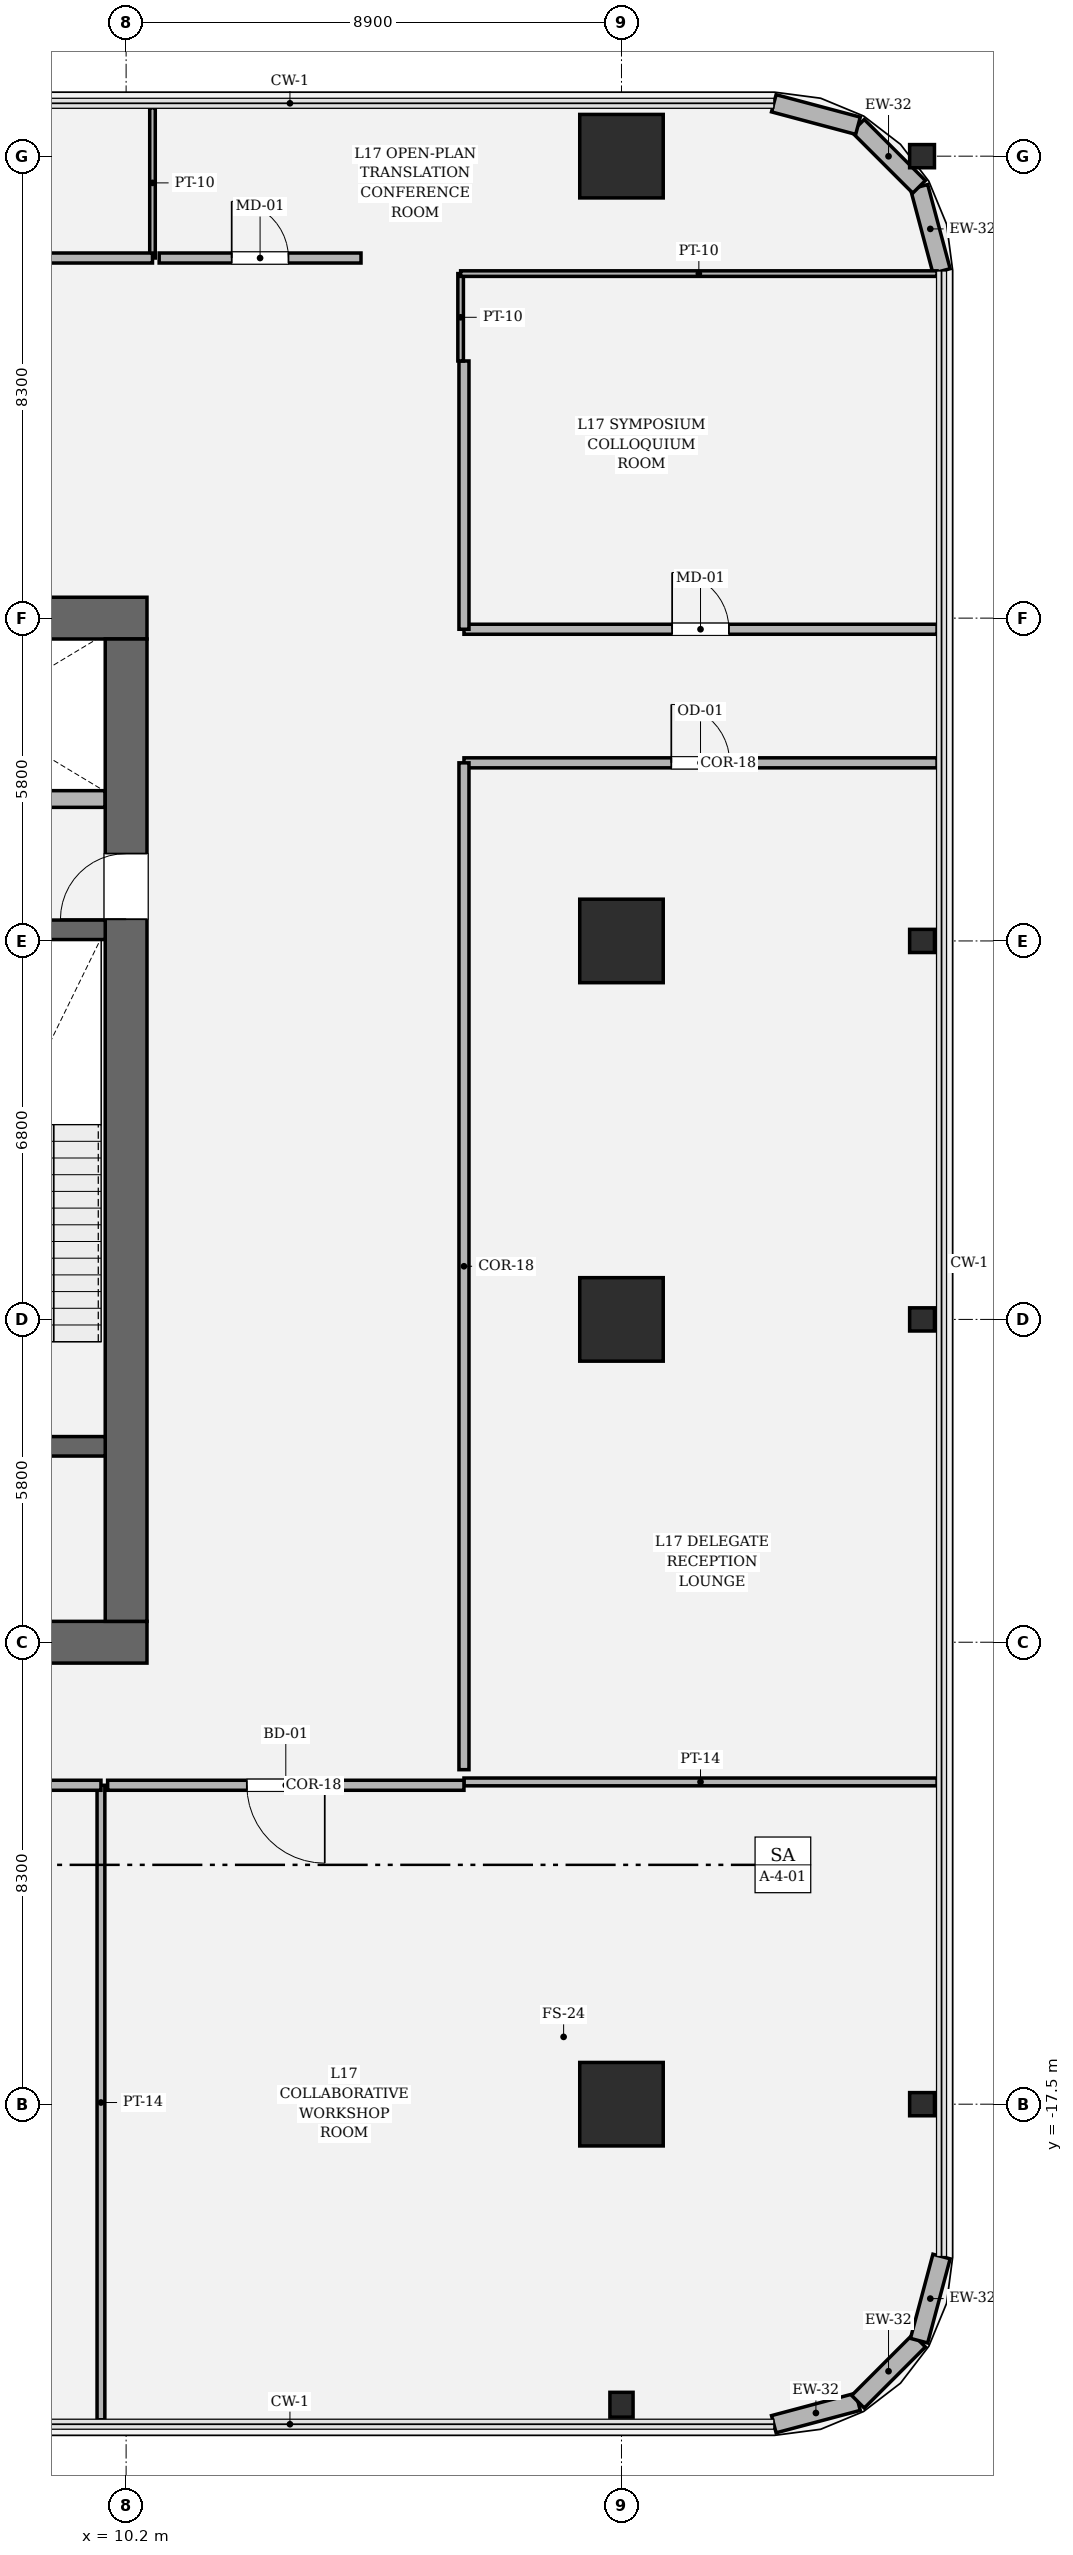
"""IFC4 building model, lengths in metres.
Left out: names, types, materials, properties, quantities, classifications, styles, units other than length and angle.
Written with IfcOpenShell. Run it as: python <this file> out.ifc"""

import sys

from ifc_helpers import new_model, si_unit, direction, frame, frame_2d, origin, origin_2d, place, context, subcontext, project, spatial, rectangle, hollow_rectangle, i_section, extrude, element, fill, save


model = new_model("IFC4")
c1 = context("Model", 3, precision=1e-05, world=origin(), true_north=direction((0.0, 1.0)))
c2 = subcontext(c1, "Body", "Model", "MODEL_VIEW")
j1 = project(units=[si_unit("LENGTHUNIT", "METRE"), si_unit("PLANEANGLEUNIT", "RADIAN")], contexts=[c1])
p1 = place(None, origin())
s1 = spatial("IfcSite", under=j1, at=p1, CompositionType="ELEMENT")
p2 = place(p1, origin())
s2 = spatial("IfcBuilding", under=s1, at=p2, CompositionType="ELEMENT")
p3 = place(p2, frame((0.0, 0.0, 76.8)))
s3 = spatial("IfcBuildingStorey", under=s2, at=p3, CompositionType="ELEMENT", Elevation=76.8)
p4 = place(p3, frame((10.575, -9.2, 0.0), z_axis=(0.0, 0.0, 1.0), x_axis=(-1.0, 0.0, 0.0)))
e1 = element("IfcWall", 1, at=p4, inside=s3, PredefinedType="SHEAR", context=c2, shape_type="SweptSolid", body=[
    extrude(rectangle(XDim=21.15, YDim=0.75, at=frame_2d((10.575, 0.0))), origin(), (0.0, 0.0, 1.0), 4.05),
])
p5 = place(p4, frame((2.85, 0.0, 0.0)))
e2 = element("IfcOpeningElement", 2, at=p5, cuts=e1, PredefinedType="OPENING", context=c2, shape_type="SweptSolid", body=[
    extrude(rectangle(XDim=1.25, YDim=2.25, at=frame_2d((0.625, 1.125))), frame((0.0, 0.385, 0.0), z_axis=(0.0, -1.0, 0.0), x_axis=(1.0, 0.0, 0.0)), (0.0, 0.0, 1.0), 0.77),
])
p6 = place(p4, frame((17.05, 0.0, 0.0)))
e3 = element("IfcOpeningElement", 3, at=p6, cuts=e1, PredefinedType="OPENING", context=c2, shape_type="SweptSolid", body=[
    extrude(rectangle(XDim=1.25, YDim=2.25, at=frame_2d((0.625, 1.125))), frame((0.0, 0.385, 0.0), z_axis=(0.0, -1.0, 0.0), x_axis=(1.0, 0.0, 0.0)), (0.0, 0.0, 1.0), 0.77),
])
p7 = place(p3, frame((-10.575, 9.2, 0.0), z_axis=(0.0, 0.0, 1.0), x_axis=(1.0, 0.0, 0.0)))
e4 = element("IfcWall", 4, at=p7, inside=s3, PredefinedType="SHEAR", context=c2, shape_type="SweptSolid", body=[
    extrude(rectangle(XDim=21.15, YDim=0.75, at=frame_2d((10.575, 0.0))), origin(), (0.0, 0.0, 1.0), 4.05),
])
p8 = place(p3, frame((10.2, 8.825, 0.0), z_axis=(0.0, 0.0, 1.0), x_axis=(0.0, -1.0, 0.0)))
e5 = element("IfcWall", 5, at=p8, inside=s3, PredefinedType="SHEAR", context=c2, shape_type="SweptSolid", body=[
    extrude(rectangle(XDim=17.65, YDim=0.75, at=frame_2d((8.825, 0.0))), origin(), (0.0, 0.0, 1.0), 4.05),
])
p9 = place(p8, frame((3.855, 0.0, 0.0)))
e6 = element("IfcOpeningElement", 6, at=p9, cuts=e5, PredefinedType="OPENING", context=c2, shape_type="SweptSolid", body=[
    extrude(rectangle(XDim=1.18, YDim=2.2, at=frame_2d((0.59, 1.1))), frame((0.0, 0.385, 0.0), z_axis=(0.0, -1.0, 0.0), x_axis=(1.0, 0.0, 0.0)), (0.0, 0.0, 1.0), 0.77),
])
p10 = place(p3, frame((4.65, -5.68, 0.0), z_axis=(0.0, 0.0, 1.0), x_axis=(1.0, 0.0, 0.0)))
e7 = element("IfcWall", 7, at=p10, inside=s3, PredefinedType="SOLIDWALL", context=c2, shape_type="SweptSolid", body=[
    extrude(rectangle(XDim=5.175, YDim=0.35, at=frame_2d((2.587, 0.0))), origin(), (0.0, 0.0, 1.0), 4.05),
])
p11 = place(p10, frame((2.71, 0.0, 0.0)))
e8 = element("IfcOpeningElement", 8, at=p11, cuts=e7, PredefinedType="OPENING", context=c2, shape_type="SweptSolid", body=[
    extrude(rectangle(XDim=1.18, YDim=2.2, at=frame_2d((0.59, 1.1))), frame((0.0, 0.185, 0.0), z_axis=(0.0, -1.0, 0.0), x_axis=(1.0, 0.0, 0.0)), (0.0, 0.0, 1.0), 0.37),
])
p12 = place(p3, frame((4.65, 3.6, 0.0), z_axis=(0.0, 0.0, 1.0), x_axis=(1.0, 0.0, 0.0)))
e9 = element("IfcWall", 9, at=p12, inside=s3, PredefinedType="SOLIDWALL", context=c2, shape_type="SweptSolid", body=[
    extrude(rectangle(XDim=5.175, YDim=0.35, at=frame_2d((2.587, 0.0))), origin(), (0.0, 0.0, 1.0), 4.05),
])
for number, where, z_axis, x_axis in (
    (10, (19.1, -17.5, 0.0), (0.0, 0.0, 1.0), (1.0, 0.0, 0.0)),
    (11, (19.1, -3.4, 0.0), (0.0, 0.0, 1.0), (1.0, 0.0, 0.0)),
    (12, (19.1, 3.4, 0.0), (0.0, 0.0, 1.0), (1.0, 0.0, 0.0)),
    (13, (19.1, 17.5, 0.0), (0.0, 0.0, 1.0), (1.0, 0.0, 0.0)),
):
    element("IfcColumn", number, at=place(p3, frame(where, z_axis=z_axis, x_axis=x_axis)), inside=s3, PredefinedType="COLUMN", context=c2, shape_type="SweptSolid", body=[
        extrude(hollow_rectangle(XDim=1.5, YDim=1.5, WallThickness=0.045, at=origin_2d()), origin(), (0.0, 0.0, 1.0), 4.05),
    ])
for number, where, z_axis, x_axis in (
    (14, (19.1, -22.9, 0.0), (0.0, 0.0, 1.0), (1.0, 0.0, 0.0)),
    (15, (24.5, -17.5, 0.0), (0.0, 0.0, 1.0), (0.0, 1.0, 0.0)),
    (16, (24.5, -3.4, 0.0), (0.0, 0.0, 1.0), (0.0, 1.0, 0.0)),
    (17, (24.5, 3.4, 0.0), (0.0, 0.0, 1.0), (0.0, 1.0, 0.0)),
    (18, (24.5, 17.5, 0.0), (0.0, 0.0, 1.0), (0.0, 1.0, 0.0)),
):
    element("IfcColumn", number, at=place(p3, frame(where, z_axis=z_axis, x_axis=x_axis)), inside=s3, PredefinedType="COLUMN", context=c2, shape_type="SweptSolid", body=[
        extrude(i_section(OverallWidth=0.416, OverallDepth=0.446, WebThickness=0.039, FlangeThickness=0.062, FilletRadius=0.018, at=origin_2d()), origin(), (0.0, 0.0, 1.0), 4.048),
    ])
p13 = place(p3, frame((21.837, -23.25, 0.0), z_axis=(0.0, 0.0, 1.0), x_axis=(0.966224582397, 0.257701486942, 0.0)))
e19 = element("IfcWall", 19, at=p13, inside=s3, PredefinedType="SOLIDWALL", context=c2, shape_type="SweptSolid", body=[
    extrude(rectangle(XDim=1.565, YDim=0.32, at=frame_2d((0.783, 0.0))), origin(), (0.0, 0.0, 1.0), 3.81),
])
p14 = place(p3, frame((23.349, -22.847, 0.0), z_axis=(0.0, 0.0, 1.0), x_axis=(0.707028130747, 0.707185422879, 0.0)))
e20 = element("IfcWall", 20, at=p14, inside=s3, PredefinedType="SOLIDWALL", context=c2, shape_type="SweptSolid", body=[
    extrude(rectangle(XDim=1.552, YDim=0.32, at=frame_2d((0.776, 0.0))), origin(), (0.0, 0.0, 1.0), 3.81),
])
p15 = place(p3, frame((24.447, -21.749, 0.0), z_axis=(0.0, 0.0, 1.0), x_axis=(0.257847112249, 0.966185730957, 0.0)))
e21 = element("IfcWall", 21, at=p15, inside=s3, PredefinedType="SOLIDWALL", context=c2, shape_type="SweptSolid", body=[
    extrude(rectangle(XDim=1.565, YDim=0.32, at=frame_2d((0.783, 0.0))), origin(), (0.0, 0.0, 1.0), 3.81),
])
p16 = place(p3, frame((24.85, 15.437, 0.0), z_axis=(0.0, 0.0, 1.0), x_axis=(-0.257847112249, 0.966185730957, 0.0)))
e22 = element("IfcWall", 22, at=p16, inside=s3, PredefinedType="SOLIDWALL", context=c2, shape_type="SweptSolid", body=[
    extrude(rectangle(XDim=1.565, YDim=0.32, at=frame_2d((0.783, 0.0))), origin(), (0.0, 0.0, 1.0), 2.524),
])
p17 = place(p3, frame((24.447, 16.949, 0.0), z_axis=(0.0, 0.0, 1.0), x_axis=(-0.707106781187, 0.707106781187, 0.0)))
e23 = element("IfcWall", 23, at=p17, inside=s3, PredefinedType="SOLIDWALL", context=c2, shape_type="SweptSolid", body=[
    extrude(rectangle(XDim=1.552, YDim=0.32, at=frame_2d((0.776, 0.0))), origin(), (0.0, 0.0, 1.0), 2.484),
])
p18 = place(p3, frame((23.349, 18.047, 0.0), z_axis=(0.0, 0.0, 1.0), x_axis=(-0.966224582397, 0.257701486942, 0.0)))
e24 = element("IfcWall", 24, at=p18, inside=s3, PredefinedType="SOLIDWALL", context=c2, shape_type="SweptSolid", body=[
    extrude(rectangle(XDim=1.565, YDim=0.32, at=frame_2d((0.783, 0.0))), origin(), (0.0, 0.0, 1.0), 3.81),
])
p19 = place(p3, frame((5.06, 5.95, 0.0), z_axis=(0.0, 0.0, 1.0), x_axis=(1.0, 0.0, 0.0)))
e25 = element("IfcWall", 25, at=p19, inside=s3, PredefinedType="SOLIDWALL", context=c2, shape_type="SweptSolid", body=[
    extrude(rectangle(XDim=4.76, YDim=0.3, at=frame_2d((2.38, 0.0))), origin(), (0.0, 0.0, 1.0), 3.81),
])
p20 = place(p3, frame((9.748, -11.77, 0.0), z_axis=(0.0, 0.0, 1.0), x_axis=(0.0, -1.0, 0.0)))
e26 = element("IfcWall", 26, at=p20, inside=s3, PredefinedType="PARTITIONING", context=c2, shape_type="SweptSolid", body=[
    extrude(rectangle(XDim=11.4, YDim=0.14, at=frame_2d((5.7, 0.0))), origin(), (0.0, 0.0, 1.0), 2.524),
])
p21 = place(p3, frame((-7.726, -11.77, 0.0), z_axis=(0.0, 0.0, 1.0), x_axis=(1.0, 0.0, 0.0)))
e27 = element("IfcWall", 27, at=p21, inside=s3, PredefinedType="PARTITIONING", context=c2, shape_type="SweptSolid", body=[
    extrude(rectangle(XDim=17.474, YDim=0.18, at=frame_2d((8.737, 0.0))), origin(), (0.0, 0.0, 1.0), 3.104),
])
p22 = place(p21, frame((8.037, 0.0, 0.0)))
e28 = element("IfcOpeningElement", 28, at=p22, cuts=e27, PredefinedType="OPENING", context=c2, shape_type="SweptSolid", body=[
    extrude(rectangle(XDim=1.4, YDim=2.25, at=frame_2d((0.7, 1.125))), frame((0.0, 0.1, 0.0), z_axis=(0.0, -1.0, 0.0), x_axis=(1.0, 0.0, 0.0)), (0.0, 0.0, 1.0), 0.2),
])
p23 = place(p3, frame((16.27, -11.71, 0.0), z_axis=(0.0, 0.0, 1.0), x_axis=(1.0, 0.0, 0.0)))
e29 = element("IfcWall", 29, at=p23, inside=s3, PredefinedType="PARTITIONING", context=c2, shape_type="SweptSolid", body=[
    extrude(rectangle(XDim=8.5, YDim=0.14, at=frame_2d((4.25, 0.0))), origin(), (0.0, 0.0, 1.0), 2.524),
])
p24 = place(p3, frame((9.868, -11.77, 0.0), z_axis=(0.0, 0.0, 1.0), x_axis=(1.0, 0.0, 0.0)))
e30 = element("IfcWall", 30, at=p24, inside=s3, PredefinedType="PARTITIONING", context=c2, shape_type="SweptSolid", body=[
    extrude(rectangle(XDim=6.402, YDim=0.18, at=frame_2d((3.201, 0.0))), origin(), (0.0, 0.0, 1.0), 3.104),
])
p25 = place(p24, frame((2.501, 0.0, 0.0)))
e31 = element("IfcOpeningElement", 31, at=p25, cuts=e30, PredefinedType="OPENING", context=c2, shape_type="SweptSolid", body=[
    extrude(rectangle(XDim=1.4, YDim=2.25, at=frame_2d((0.7, 1.125))), frame((0.0, 0.1, 0.0), z_axis=(0.0, -1.0, 0.0), x_axis=(1.0, 0.0, 0.0)), (0.0, 0.0, 1.0), 0.2),
])
p26 = place(p3, frame((16.27, 6.6, 0.0), z_axis=(0.0, 0.0, 1.0), x_axis=(1.0, 0.0, 0.0)))
e32 = element("IfcWall", 32, at=p26, inside=s3, PredefinedType="PARTITIONING", context=c2, shape_type="SweptSolid", body=[
    extrude(rectangle(XDim=8.5, YDim=0.18, at=frame_2d((4.25, 0.0))), origin(), (0.0, 0.0, 1.0), 2.524),
])
p27 = place(p26, frame((3.725, 0.0, 0.0)))
e33 = element("IfcOpeningElement", 33, at=p27, cuts=e32, PredefinedType="OPENING", context=c2, shape_type="SweptSolid", body=[
    extrude(rectangle(XDim=1.05, YDim=2.2, at=frame_2d((0.525, 1.1))), frame((0.0, 0.1, 0.0), z_axis=(0.0, -1.0, 0.0), x_axis=(1.0, 0.0, 0.0)), (0.0, 0.0, 1.0), 0.2),
])
p28 = place(p3, frame((16.27, -11.49, 0.0), z_axis=(0.0, 0.0, 1.0), x_axis=(0.0, 1.0, 0.0)))
e34 = element("IfcWall", 34, at=p28, inside=s3, PredefinedType="PARTITIONING", context=c2, shape_type="SweptSolid", body=[
    extrude(rectangle(XDim=18.09, YDim=0.18, at=frame_2d((9.045, 0.0))), origin(), (0.0, 0.0, 1.0), 3.104),
])
p29 = place(p3, frame((24.77, 9.0, 0.0), z_axis=(0.0, 0.0, 1.0), x_axis=(-1.0, 0.0, 0.0)))
e35 = element("IfcWall", 35, at=p29, inside=s3, PredefinedType="PARTITIONING", context=c2, shape_type="SweptSolid", body=[
    extrude(rectangle(XDim=8.5, YDim=0.18, at=frame_2d((4.25, 0.0))), origin(), (0.0, 0.0, 1.0), 2.524),
])
p30 = place(p29, frame((3.74, 0.0, 0.0)))
e36 = element("IfcOpeningElement", 36, at=p30, cuts=e35, PredefinedType="OPENING", context=c2, shape_type="SweptSolid", body=[
    extrude(rectangle(XDim=1.02, YDim=2.2, at=frame_2d((0.51, 1.1))), frame((0.0, 0.1, 0.0), z_axis=(0.0, -1.0, 0.0), x_axis=(1.0, 0.0, 0.0)), (0.0, 0.0, 1.0), 0.2),
])
p31 = place(p3, frame((16.27, 9.0, 0.0), z_axis=(0.0, 0.0, 1.0), x_axis=(0.0, 1.0, 0.0)))
e37 = element("IfcWall", 37, at=p31, inside=s3, PredefinedType="PARTITIONING", context=c2, shape_type="SweptSolid", body=[
    extrude(rectangle(XDim=4.82, YDim=0.18, at=frame_2d((2.41, 0.0))), origin(), (0.0, 0.0, 1.0), 3.104),
])
p32 = place(p3, frame((16.21, 13.82, 0.0), z_axis=(0.0, 0.0, 1.0), x_axis=(0.0, 1.0, 0.0)))
e38 = element("IfcWall", 38, at=p32, inside=s3, PredefinedType="PARTITIONING", context=c2, shape_type="SweptSolid", body=[
    extrude(rectangle(XDim=1.57, YDim=0.1, at=frame_2d((0.785, 0.0))), origin(), (0.0, 0.0, 1.0), 3.81),
])
p33 = place(p3, frame((16.21, 15.39, 0.0), z_axis=(0.0, 0.0, 1.0), x_axis=(1.0, 0.0, 0.0)))
e39 = element("IfcWall", 39, at=p33, inside=s3, PredefinedType="PARTITIONING", context=c2, shape_type="SweptSolid", body=[
    extrude(rectangle(XDim=8.56, YDim=0.1, at=frame_2d((4.28, 0.0))), origin(), (0.0, 0.0, 1.0), 2.524),
])
p34 = place(p3, frame((10.674, 18.37, 0.0), z_axis=(0.0, 0.0, 1.0), x_axis=(0.0, -1.0, 0.0)))
e40 = element("IfcWall", 40, at=p34, inside=s3, PredefinedType="PARTITIONING", context=c2, shape_type="SweptSolid", body=[
    extrude(rectangle(XDim=2.7, YDim=0.1, at=frame_2d((1.35, 0.0))), origin(), (0.0, 0.0, 1.0), 3.104),
])
p35 = place(p3, frame((10.674, 15.67, 0.0), z_axis=(0.0, 0.0, 1.0), x_axis=(-1.0, 0.0, 0.0)))
e41 = element("IfcWall", 41, at=p35, inside=s3, PredefinedType="PARTITIONING", context=c2, shape_type="SweptSolid", body=[
    extrude(rectangle(XDim=23.444, YDim=0.18, at=frame_2d((11.722, 0.0))), origin(), (0.0, 0.0, 1.0), 3.104),
])
p36 = place(p35, frame((15.522, 0.0, 0.0)))
e42 = element("IfcOpeningElement", 42, at=p36, cuts=e41, PredefinedType="OPENING", context=c2, shape_type="SweptSolid", body=[
    extrude(rectangle(XDim=1.4, YDim=2.25, at=frame_2d((0.7, 1.125))), frame((0.0, 0.1, 0.0), z_axis=(0.0, -1.0, 0.0), x_axis=(1.0, 0.0, 0.0)), (0.0, 0.0, 1.0), 0.2),
])
p37 = place(p3, frame((14.42, 15.67, 0.0), z_axis=(0.0, 0.0, 1.0), x_axis=(-1.0, 0.0, 0.0)))
e43 = element("IfcWall", 43, at=p37, inside=s3, PredefinedType="PARTITIONING", context=c2, shape_type="SweptSolid", body=[
    extrude(rectangle(XDim=3.626, YDim=0.18, at=frame_2d((1.813, 0.0))), origin(), (0.0, 0.0, 1.0), 3.81),
])
p38 = place(p37, frame((1.303, 0.0, 0.0)))
e44 = element("IfcOpeningElement", 44, at=p38, cuts=e43, PredefinedType="OPENING", context=c2, shape_type="SweptSolid", body=[
    extrude(rectangle(XDim=1.02, YDim=2.2, at=frame_2d((0.51, 1.1))), frame((0.0, 0.1, 0.0), z_axis=(0.0, -1.0, 0.0), x_axis=(1.0, 0.0, 0.0)), (0.0, 0.0, 1.0), 0.2),
])
p39 = place(p9, origin())
e45 = element("IfcDoor", 45, at=p39, inside=s3, OperationType="SINGLE_SWING_RIGHT", PredefinedType="DOOR", context=c2, shape_type="SweptSolid", body=[
    extrude(rectangle(XDim=1.18, YDim=2.2, at=frame_2d((0.59, 1.1))), frame((0.0, 0.025, 0.0), z_axis=(0.0, -1.0, 0.0), x_axis=(1.0, 0.0, 0.0)), (0.0, 0.0, 1.0), 0.05),
])
fill(e6, e45)
p40 = place(p25, origin())
e46 = element("IfcDoor", 46, at=p40, inside=s3, OperationType="SINGLE_SWING_RIGHT", PredefinedType="DOOR", context=c2, shape_type="SweptSolid", body=[
    extrude(rectangle(XDim=1.4, YDim=2.25, at=frame_2d((0.7, 1.125))), frame((0.0, 0.025, 0.0), z_axis=(0.0, -1.0, 0.0), x_axis=(1.0, 0.0, 0.0)), (0.0, 0.0, 1.0), 0.05),
])
fill(e31, e46)
p41 = place(p27, origin())
e47 = element("IfcDoor", 47, at=p41, inside=s3, OperationType="SINGLE_SWING_LEFT", PredefinedType="DOOR", context=c2, shape_type="SweptSolid", body=[
    extrude(rectangle(XDim=1.05, YDim=2.2, at=frame_2d((0.525, 1.1))), frame((0.0, 0.025, 0.0), z_axis=(0.0, -1.0, 0.0), x_axis=(1.0, 0.0, 0.0)), (0.0, 0.0, 1.0), 0.05),
])
fill(e33, e47)
p42 = place(p30, origin())
e48 = element("IfcDoor", 48, at=p42, inside=s3, OperationType="SINGLE_SWING_RIGHT", PredefinedType="DOOR", context=c2, shape_type="SweptSolid", body=[
    extrude(rectangle(XDim=1.02, YDim=2.2, at=frame_2d((0.51, 1.1))), frame((0.0, 0.025, 0.0), z_axis=(0.0, -1.0, 0.0), x_axis=(1.0, 0.0, 0.0)), (0.0, 0.0, 1.0), 0.05),
])
fill(e36, e48)
p43 = place(p38, origin())
e49 = element("IfcDoor", 49, at=p43, inside=s3, OperationType="SINGLE_SWING_RIGHT", PredefinedType="DOOR", context=c2, shape_type="SweptSolid", body=[
    extrude(rectangle(XDim=1.02, YDim=2.2, at=frame_2d((0.51, 1.1))), frame((0.0, 0.025, 0.0), z_axis=(0.0, -1.0, 0.0), x_axis=(1.0, 0.0, 0.0)), (0.0, 0.0, 1.0), 0.05),
])
fill(e44, e49)
save(model, sys.argv[1])
